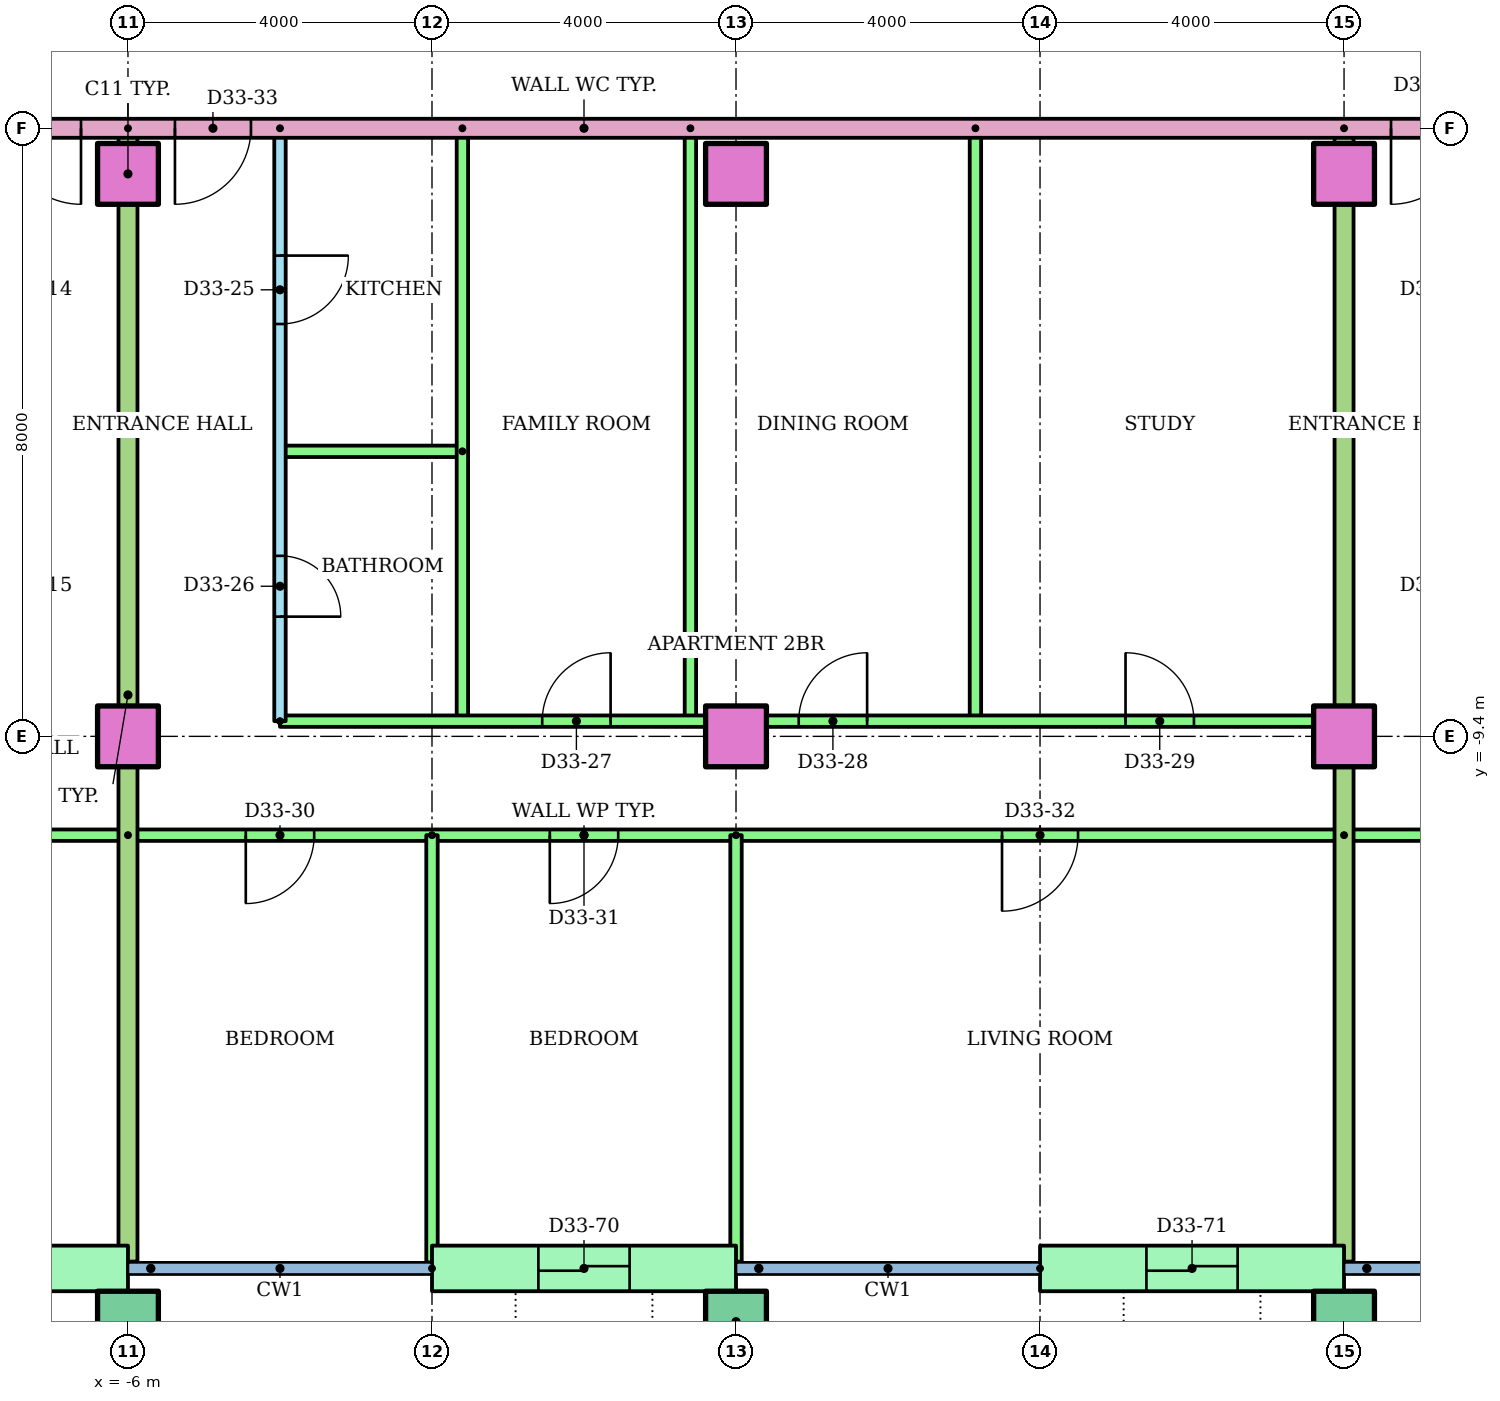
"""IFC4 building model, lengths in metres.
Left out: names, types, materials, properties, quantities, classifications, styles, units other than length and angle.
Written with IfcOpenShell. Run it as: python <this file> out.ifc"""

import sys

from ifc_helpers import new_model, si_unit, direction, frame, frame_2d, origin, origin_2d, place, context, subcontext, project, spatial, rectangle, hollow_rectangle, extrude, element, fill, save


model = new_model("IFC4")
c1 = context("Model", 3, precision=1e-05, world=origin(), true_north=direction((0.0, 1.0)))
c2 = subcontext(c1, "Body", "Model", "MODEL_VIEW")
j1 = project(units=[si_unit("LENGTHUNIT", "METRE"), si_unit("PLANEANGLEUNIT", "RADIAN")], contexts=[c1])
p1 = place(None, origin())
s1 = spatial("IfcSite", under=j1, at=p1, CompositionType="ELEMENT")
p2 = place(p1, origin())
s2 = spatial("IfcBuilding", under=s1, at=p2, CompositionType="ELEMENT")
p3 = place(p2, frame((0.0, 0.0, 129.4)))
s3 = spatial("IfcBuildingStorey", under=s2, at=p3, CompositionType="ELEMENT", Elevation=129.4)
for number, where in (
    (1, (-6.0, -17.1, 0.0)),
    (2, (2.0, -17.1, 0.0)),
    (3, (10.0, -17.1, 0.0)),
):
    element("IfcColumn", number, at=place(p3, frame(where)), inside=s3, PredefinedType="COLUMN", context=c2, shape_type="SweptSolid", body=[
        extrude(hollow_rectangle(XDim=0.8, YDim=0.8, WallThickness=0.04, at=origin_2d()), origin(), (0.0, 0.0, 1.0), 3.2),
    ])
for number, where in (
    (4, (-6.0, -9.4, 0.0)),
    (5, (2.0, -9.4, 0.0)),
    (6, (10.0, -9.4, 0.0)),
    (7, (-6.0, -2.0, 0.0)),
    (8, (2.0, -2.0, 0.0)),
    (9, (10.0, -2.0, 0.0)),
):
    element("IfcColumn", number, at=place(p3, frame(where)), inside=s3, PredefinedType="COLUMN", context=c2, shape_type="SweptSolid", body=[
        extrude(rectangle(XDim=0.8, YDim=0.8, at=origin_2d()), origin(), (0.0, 0.0, 1.0), 3.2),
    ])
p4 = place(p3, frame((-10.0, -16.4, 0.0)))
e10 = element("IfcWall", 10, at=p4, inside=s3, PredefinedType="STANDARD", context=c2, shape_type="SweptSolid", body=[
    extrude(rectangle(XDim=4.0, YDim=0.6, at=frame_2d((2.0, 0.0))), origin(), (0.0, 0.0, 1.0), 2.92),
])
p5 = place(p4, frame((1.4, 0.0, 0.0)))
e11 = element("IfcOpeningElement", 11, at=p5, cuts=e10, PredefinedType="OPENING", context=c2, shape_type="SweptSolid", body=[
    extrude(rectangle(XDim=1.2, YDim=2.1, at=frame_2d((0.6, 1.05))), frame((0.0, 0.31, 0.0), z_axis=(0.0, -1.0, 0.0), x_axis=(1.0, 0.0, 0.0)), (0.0, 0.0, 1.0), 0.62),
])
p6 = place(p3, frame((-2.0, -16.4, 0.0)))
e12 = element("IfcWall", 12, at=p6, inside=s3, PredefinedType="STANDARD", context=c2, shape_type="SweptSolid", body=[
    extrude(rectangle(XDim=4.0, YDim=0.6, at=frame_2d((2.0, 0.0))), origin(), (0.0, 0.0, 1.0), 2.92),
])
p7 = place(p6, frame((1.4, 0.0, 0.0)))
e13 = element("IfcOpeningElement", 13, at=p7, cuts=e12, PredefinedType="OPENING", context=c2, shape_type="SweptSolid", body=[
    extrude(rectangle(XDim=1.2, YDim=2.1, at=frame_2d((0.6, 1.05))), frame((0.0, 0.31, 0.0), z_axis=(0.0, -1.0, 0.0), x_axis=(1.0, 0.0, 0.0)), (0.0, 0.0, 1.0), 0.62),
])
p8 = place(p3, frame((6.0, -16.4, 0.0)))
e14 = element("IfcWall", 14, at=p8, inside=s3, PredefinedType="STANDARD", context=c2, shape_type="SweptSolid", body=[
    extrude(rectangle(XDim=4.0, YDim=0.6, at=frame_2d((2.0, 0.0))), origin(), (0.0, 0.0, 1.0), 2.92),
])
p9 = place(p8, frame((1.4, 0.0, 0.0)))
e15 = element("IfcOpeningElement", 15, at=p9, cuts=e14, PredefinedType="OPENING", context=c2, shape_type="SweptSolid", body=[
    extrude(rectangle(XDim=1.2, YDim=2.1, at=frame_2d((0.6, 1.05))), frame((0.0, 0.31, 0.0), z_axis=(0.0, -1.0, 0.0), x_axis=(1.0, 0.0, 0.0)), (0.0, 0.0, 1.0), 0.62),
])
p10 = place(p3, frame((-6.0, -10.7, 0.0), z_axis=(0.0, 0.0, 1.0), x_axis=(-1.0, 0.0, 0.0)))
e16 = element("IfcWall", 16, at=p10, inside=s3, PredefinedType="PARTITIONING", context=c2, shape_type="SweptSolid", body=[
    extrude(rectangle(XDim=26.72, YDim=0.15, at=frame_2d((13.36, 0.0))), origin(), (0.0, 0.0, 1.0), 2.4),
])
p11 = place(p10, frame((20.75, 0.0, 0.0)))
e17 = element("IfcOpeningElement", 17, at=p11, cuts=e16, PredefinedType="OPENING", context=c2, shape_type="SweptSolid", body=[
    extrude(rectangle(XDim=1.0, YDim=2.1, at=frame_2d((0.5, 1.05))), frame((0.0, 0.085, 0.0), z_axis=(0.0, -1.0, 0.0), x_axis=(1.0, 0.0, 0.0)), (0.0, 0.0, 1.0), 0.17),
])
p12 = place(p10, frame((13.55, 0.0, 0.0)))
e18 = element("IfcOpeningElement", 18, at=p12, cuts=e16, PredefinedType="OPENING", context=c2, shape_type="SweptSolid", body=[
    extrude(rectangle(XDim=0.9, YDim=2.1, at=frame_2d((0.45, 1.05))), frame((0.0, 0.085, 0.0), z_axis=(0.0, -1.0, 0.0), x_axis=(1.0, 0.0, 0.0)), (0.0, 0.0, 1.0), 0.17),
])
p13 = place(p10, frame((9.55, 0.0, 0.0)))
e19 = element("IfcOpeningElement", 19, at=p13, cuts=e16, PredefinedType="OPENING", context=c2, shape_type="SweptSolid", body=[
    extrude(rectangle(XDim=0.9, YDim=2.1, at=frame_2d((0.45, 1.05))), frame((0.0, 0.085, 0.0), z_axis=(0.0, -1.0, 0.0), x_axis=(1.0, 0.0, 0.0)), (0.0, 0.0, 1.0), 0.17),
])
p14 = place(p10, frame((5.55, 0.0, 0.0)))
e20 = element("IfcOpeningElement", 20, at=p14, cuts=e16, PredefinedType="OPENING", context=c2, shape_type="SweptSolid", body=[
    extrude(rectangle(XDim=0.9, YDim=2.1, at=frame_2d((0.45, 1.05))), frame((0.0, 0.085, 0.0), z_axis=(0.0, -1.0, 0.0), x_axis=(1.0, 0.0, 0.0)), (0.0, 0.0, 1.0), 0.17),
])
p15 = place(p10, frame((1.55, 0.0, 0.0)))
e21 = element("IfcOpeningElement", 21, at=p15, cuts=e16, PredefinedType="OPENING", context=c2, shape_type="SweptSolid", body=[
    extrude(rectangle(XDim=0.9, YDim=2.1, at=frame_2d((0.45, 1.05))), frame((0.0, 0.085, 0.0), z_axis=(0.0, -1.0, 0.0), x_axis=(1.0, 0.0, 0.0)), (0.0, 0.0, 1.0), 0.17),
])
p16 = place(p3, frame((-4.0, -1.4, 0.0), z_axis=(0.0, 0.0, 1.0), x_axis=(0.0, -1.0, 0.0)))
e22 = element("IfcWall", 22, at=p16, inside=s3, PredefinedType="PARTITIONING", context=c2, shape_type="SweptSolid", body=[
    extrude(rectangle(XDim=7.8, YDim=0.15, at=frame_2d((3.9, 0.0))), origin(), (0.0, 0.0, 1.0), 2.4),
])
p17 = place(p16, frame((1.675, 0.0, 0.0)))
e23 = element("IfcOpeningElement", 23, at=p17, cuts=e22, PredefinedType="OPENING", context=c2, shape_type="SweptSolid", body=[
    extrude(rectangle(XDim=0.9, YDim=2.1, at=frame_2d((0.45, 1.05))), frame((0.0, 0.085, 0.0), z_axis=(0.0, -1.0, 0.0), x_axis=(1.0, 0.0, 0.0)), (0.0, 0.0, 1.0), 0.17),
])
p18 = place(p16, frame((5.625, 0.0, 0.0)))
e24 = element("IfcOpeningElement", 24, at=p18, cuts=e22, PredefinedType="OPENING", context=c2, shape_type="SweptSolid", body=[
    extrude(rectangle(XDim=0.8, YDim=2.1, at=frame_2d((0.4, 1.05))), frame((0.0, 0.085, 0.0), z_axis=(0.0, -1.0, 0.0), x_axis=(1.0, 0.0, 0.0)), (0.0, 0.0, 1.0), 0.17),
])
p19 = place(p3, frame((-1.6, -5.65, 0.0), z_axis=(0.0, 0.0, 1.0), x_axis=(-1.0, 0.0, 0.0)))
e25 = element("IfcWall", 25, at=p19, inside=s3, PredefinedType="PARTITIONING", context=c2, shape_type="SweptSolid", body=[
    extrude(rectangle(XDim=2.4, YDim=0.15, at=frame_2d((1.2, 0.0))), origin(), (0.0, 0.0, 1.0), 2.4),
])
for number, where, z_axis, x_axis in (
    (26, (-1.6, -1.4, 0.0), (0.0, 0.0, 1.0), (0.0, -1.0, 0.0)),
    (27, (1.4, -1.4, 0.0), (0.0, 0.0, 1.0), (0.0, -1.0, 0.0)),
    (28, (5.15, -1.4, 0.0), (0.0, 0.0, 1.0), (0.0, -1.0, 0.0)),
):
    element("IfcWall", number, at=place(p3, frame(where, z_axis=z_axis, x_axis=x_axis)), inside=s3, PredefinedType="PARTITIONING", context=c2, shape_type="SweptSolid", body=[
        extrude(rectangle(XDim=7.8, YDim=0.15, at=frame_2d((3.9, 0.0))), origin(), (0.0, 0.0, 1.0), 2.4),
    ])
p20 = place(p3, frame((-4.0, -9.2, 0.0)))
e29 = element("IfcWall", 29, at=p20, inside=s3, PredefinedType="PARTITIONING", context=c2, shape_type="SweptSolid", body=[
    extrude(rectangle(XDim=14.0, YDim=0.15, at=frame_2d((7.0, 0.0))), origin(), (0.0, 0.0, 1.0), 2.4),
])
p21 = place(p20, frame((3.45, 0.0, 0.0)))
e30 = element("IfcOpeningElement", 30, at=p21, cuts=e29, PredefinedType="OPENING", context=c2, shape_type="SweptSolid", body=[
    extrude(rectangle(XDim=0.9, YDim=2.1, at=frame_2d((0.45, 1.05))), frame((0.0, 0.085, 0.0), z_axis=(0.0, -1.0, 0.0), x_axis=(1.0, 0.0, 0.0)), (0.0, 0.0, 1.0), 0.17),
])
p22 = place(p20, frame((6.825, 0.0, 0.0)))
e31 = element("IfcOpeningElement", 31, at=p22, cuts=e29, PredefinedType="OPENING", context=c2, shape_type="SweptSolid", body=[
    extrude(rectangle(XDim=0.9, YDim=2.1, at=frame_2d((0.45, 1.05))), frame((0.0, 0.085, 0.0), z_axis=(0.0, -1.0, 0.0), x_axis=(1.0, 0.0, 0.0)), (0.0, 0.0, 1.0), 0.17),
])
p23 = place(p20, frame((11.125, 0.0, 0.0)))
e32 = element("IfcOpeningElement", 32, at=p23, cuts=e29, PredefinedType="OPENING", context=c2, shape_type="SweptSolid", body=[
    extrude(rectangle(XDim=0.9, YDim=2.1, at=frame_2d((0.45, 1.05))), frame((0.0, 0.085, 0.0), z_axis=(0.0, -1.0, 0.0), x_axis=(1.0, 0.0, 0.0)), (0.0, 0.0, 1.0), 0.17),
])
p24 = place(p3, frame((10.0, -10.7, 0.0), z_axis=(0.0, 0.0, 1.0), x_axis=(-1.0, 0.0, 0.0)))
e33 = element("IfcWall", 33, at=p24, inside=s3, PredefinedType="PARTITIONING", context=c2, shape_type="SweptSolid", body=[
    extrude(rectangle(XDim=16.0, YDim=0.15, at=frame_2d((8.0, 0.0))), origin(), (0.0, 0.0, 1.0), 2.4),
])
p25 = place(p24, frame((13.55, 0.0, 0.0)))
e34 = element("IfcOpeningElement", 34, at=p25, cuts=e33, PredefinedType="OPENING", context=c2, shape_type="SweptSolid", body=[
    extrude(rectangle(XDim=0.9, YDim=2.1, at=frame_2d((0.45, 1.05))), frame((0.0, 0.085, 0.0), z_axis=(0.0, -1.0, 0.0), x_axis=(1.0, 0.0, 0.0)), (0.0, 0.0, 1.0), 0.17),
])
p26 = place(p24, frame((9.55, 0.0, 0.0)))
e35 = element("IfcOpeningElement", 35, at=p26, cuts=e33, PredefinedType="OPENING", context=c2, shape_type="SweptSolid", body=[
    extrude(rectangle(XDim=0.9, YDim=2.1, at=frame_2d((0.45, 1.05))), frame((0.0, 0.085, 0.0), z_axis=(0.0, -1.0, 0.0), x_axis=(1.0, 0.0, 0.0)), (0.0, 0.0, 1.0), 0.17),
])
p27 = place(p24, frame((3.5, 0.0, 0.0)))
e36 = element("IfcOpeningElement", 36, at=p27, cuts=e33, PredefinedType="OPENING", context=c2, shape_type="SweptSolid", body=[
    extrude(rectangle(XDim=1.0, YDim=2.1, at=frame_2d((0.5, 1.05))), frame((0.0, 0.085, 0.0), z_axis=(0.0, -1.0, 0.0), x_axis=(1.0, 0.0, 0.0)), (0.0, 0.0, 1.0), 0.17),
])
p28 = place(p3, frame((-2.0, -10.7, 0.0), z_axis=(0.0, 0.0, 1.0), x_axis=(0.0, -1.0, 0.0)))
e37 = element("IfcWall", 37, at=p28, inside=s3, PredefinedType="PARTITIONING", context=c2, shape_type="SweptSolid", body=[
    extrude(rectangle(XDim=5.621, YDim=0.15, at=frame_2d((2.811, 0.0))), origin(), (0.0, 0.0, 1.0), 2.4),
])
p29 = place(p3, frame((2.0, -10.7, 0.0), z_axis=(0.0, 0.0, 1.0), x_axis=(0.0, -1.0, 0.0)))
e38 = element("IfcWall", 38, at=p29, inside=s3, PredefinedType="PARTITIONING", context=c2, shape_type="SweptSolid", body=[
    extrude(rectangle(XDim=5.61, YDim=0.15, at=frame_2d((2.805, 0.0))), origin(), (0.0, 0.0, 1.0), 2.4),
])
p30 = place(p3, frame((-6.0, -1.4, 0.0), z_axis=(0.0, 0.0, 1.0), x_axis=(0.0, -1.0, 0.0)))
e39 = element("IfcWall", 39, at=p30, inside=s3, PredefinedType="PARTITIONING", context=c2, shape_type="SweptSolid", body=[
    extrude(rectangle(XDim=14.91, YDim=0.25, at=frame_2d((7.455, 0.0))), origin(), (0.0, 0.0, 1.0), 2.4),
])
p31 = place(p3, frame((32.72, -10.7, 0.0), z_axis=(0.0, 0.0, 1.0), x_axis=(-1.0, 0.0, 0.0)))
e40 = element("IfcWall", 40, at=p31, inside=s3, PredefinedType="PARTITIONING", context=c2, shape_type="SweptSolid", body=[
    extrude(rectangle(XDim=22.72, YDim=0.15, at=frame_2d((11.36, 0.0))), origin(), (0.0, 0.0, 1.0), 2.4),
])
p32 = place(p31, frame((20.27, 0.0, 0.0)))
e41 = element("IfcOpeningElement", 41, at=p32, cuts=e40, PredefinedType="OPENING", context=c2, shape_type="SweptSolid", body=[
    extrude(rectangle(XDim=0.9, YDim=2.1, at=frame_2d((0.45, 1.05))), frame((0.0, 0.085, 0.0), z_axis=(0.0, -1.0, 0.0), x_axis=(1.0, 0.0, 0.0)), (0.0, 0.0, 1.0), 0.17),
])
p33 = place(p31, frame((16.27, 0.0, 0.0)))
e42 = element("IfcOpeningElement", 42, at=p33, cuts=e40, PredefinedType="OPENING", context=c2, shape_type="SweptSolid", body=[
    extrude(rectangle(XDim=0.9, YDim=2.1, at=frame_2d((0.45, 1.05))), frame((0.0, 0.085, 0.0), z_axis=(0.0, -1.0, 0.0), x_axis=(1.0, 0.0, 0.0)), (0.0, 0.0, 1.0), 0.17),
])
p34 = place(p31, frame((10.22, 0.0, 0.0)))
e43 = element("IfcOpeningElement", 43, at=p34, cuts=e40, PredefinedType="OPENING", context=c2, shape_type="SweptSolid", body=[
    extrude(rectangle(XDim=1.0, YDim=2.1, at=frame_2d((0.5, 1.05))), frame((0.0, 0.085, 0.0), z_axis=(0.0, -1.0, 0.0), x_axis=(1.0, 0.0, 0.0)), (0.0, 0.0, 1.0), 0.17),
])
p35 = place(p31, frame((3.02, 0.0, 0.0)))
e44 = element("IfcOpeningElement", 44, at=p35, cuts=e40, PredefinedType="OPENING", context=c2, shape_type="SweptSolid", body=[
    extrude(rectangle(XDim=0.9, YDim=2.1, at=frame_2d((0.45, 1.05))), frame((0.0, 0.085, 0.0), z_axis=(0.0, -1.0, 0.0), x_axis=(1.0, 0.0, 0.0)), (0.0, 0.0, 1.0), 0.17),
])
p36 = place(p3, frame((10.0, -1.4, 0.0), z_axis=(0.0, 0.0, 1.0), x_axis=(0.0, -1.0, 0.0)))
e45 = element("IfcWall", 45, at=p36, inside=s3, PredefinedType="PARTITIONING", context=c2, shape_type="SweptSolid", body=[
    extrude(rectangle(XDim=14.91, YDim=0.25, at=frame_2d((7.455, 0.0))), origin(), (0.0, 0.0, 1.0), 2.4),
])
p37 = place(p3, frame((14.0, -1.4, 0.0), z_axis=(0.0, 0.0, 1.0), x_axis=(-1.0, 0.0, 0.0)))
e46 = element("IfcWall", 46, at=p37, inside=s3, PredefinedType="PARTITIONING", context=c2, shape_type="SweptSolid", body=[
    extrude(rectangle(XDim=28.0, YDim=0.25, at=frame_2d((14.0, 0.0))), origin(), (0.0, 0.0, 1.0), 2.4),
])
p38 = place(p37, frame((20.618, 0.0, 0.0)))
e47 = element("IfcOpeningElement", 47, at=p38, cuts=e46, PredefinedType="OPENING", context=c2, shape_type="SweptSolid", body=[
    extrude(rectangle(XDim=1.0, YDim=2.1, at=frame_2d((0.5, 1.05))), frame((0.0, 0.135, 0.0), z_axis=(0.0, -1.0, 0.0), x_axis=(1.0, 0.0, 0.0)), (0.0, 0.0, 1.0), 0.27),
])
p39 = place(p37, frame((18.382, 0.0, 0.0)))
e48 = element("IfcOpeningElement", 48, at=p39, cuts=e46, PredefinedType="OPENING", context=c2, shape_type="SweptSolid", body=[
    extrude(rectangle(XDim=1.0, YDim=2.1, at=frame_2d((0.5, 1.05))), frame((0.0, 0.135, 0.0), z_axis=(0.0, -1.0, 0.0), x_axis=(1.0, 0.0, 0.0)), (0.0, 0.0, 1.0), 0.27),
])
p40 = place(p37, frame((2.382, 0.0, 0.0)))
e49 = element("IfcOpeningElement", 49, at=p40, cuts=e46, PredefinedType="OPENING", context=c2, shape_type="SweptSolid", body=[
    extrude(rectangle(XDim=1.0, YDim=2.1, at=frame_2d((0.5, 1.05))), frame((0.0, 0.135, 0.0), z_axis=(0.0, -1.0, 0.0), x_axis=(1.0, 0.0, 0.0)), (0.0, 0.0, 1.0), 0.27),
])
p41 = place(p38, origin())
e50 = element("IfcDoor", 50, at=p41, inside=s3, OperationType="SINGLE_SWING_LEFT", PredefinedType="DOOR", context=c2, shape_type="SweptSolid", body=[
    extrude(rectangle(XDim=1.0, YDim=2.1, at=frame_2d((0.5, 1.05))), frame((0.0, 0.025, 0.0), z_axis=(0.0, -1.0, 0.0), x_axis=(1.0, 0.0, 0.0)), (0.0, 0.0, 1.0), 0.05),
])
fill(e47, e50)
p42 = place(p17, origin())
e51 = element("IfcDoor", 51, at=p42, inside=s3, OperationType="SINGLE_SWING_LEFT", PredefinedType="DOOR", context=c2, shape_type="SweptSolid", body=[
    extrude(rectangle(XDim=0.9, YDim=2.1, at=frame_2d((0.45, 1.05))), frame((0.0, 0.025, 0.0), z_axis=(0.0, -1.0, 0.0), x_axis=(1.0, 0.0, 0.0)), (0.0, 0.0, 1.0), 0.05),
])
fill(e23, e51)
p43 = place(p18, origin())
e52 = element("IfcDoor", 52, at=p43, inside=s3, OperationType="SINGLE_SWING_RIGHT", PredefinedType="DOOR", context=c2, shape_type="SweptSolid", body=[
    extrude(rectangle(XDim=0.8, YDim=2.1, at=frame_2d((0.4, 1.05))), frame((0.0, 0.025, 0.0), z_axis=(0.0, -1.0, 0.0), x_axis=(1.0, 0.0, 0.0)), (0.0, 0.0, 1.0), 0.05),
])
fill(e24, e52)
p44 = place(p21, origin())
e53 = element("IfcDoor", 53, at=p44, inside=s3, OperationType="SINGLE_SWING_RIGHT", PredefinedType="DOOR", context=c2, shape_type="SweptSolid", body=[
    extrude(rectangle(XDim=0.9, YDim=2.1, at=frame_2d((0.45, 1.05))), frame((0.0, 0.025, 0.0), z_axis=(0.0, -1.0, 0.0), x_axis=(1.0, 0.0, 0.0)), (0.0, 0.0, 1.0), 0.05),
])
fill(e30, e53)
p45 = place(p22, origin())
e54 = element("IfcDoor", 54, at=p45, inside=s3, OperationType="SINGLE_SWING_RIGHT", PredefinedType="DOOR", context=c2, shape_type="SweptSolid", body=[
    extrude(rectangle(XDim=0.9, YDim=2.1, at=frame_2d((0.45, 1.05))), frame((0.0, 0.025, 0.0), z_axis=(0.0, -1.0, 0.0), x_axis=(1.0, 0.0, 0.0)), (0.0, 0.0, 1.0), 0.05),
])
fill(e31, e54)
p46 = place(p23, origin())
e55 = element("IfcDoor", 55, at=p46, inside=s3, OperationType="SINGLE_SWING_LEFT", PredefinedType="DOOR", context=c2, shape_type="SweptSolid", body=[
    extrude(rectangle(XDim=0.9, YDim=2.1, at=frame_2d((0.45, 1.05))), frame((0.0, 0.025, 0.0), z_axis=(0.0, -1.0, 0.0), x_axis=(1.0, 0.0, 0.0)), (0.0, 0.0, 1.0), 0.05),
])
fill(e32, e55)
p47 = place(p25, origin())
e56 = element("IfcDoor", 56, at=p47, inside=s3, OperationType="SINGLE_SWING_RIGHT", PredefinedType="DOOR", context=c2, shape_type="SweptSolid", body=[
    extrude(rectangle(XDim=0.9, YDim=2.1, at=frame_2d((0.45, 1.05))), frame((0.0, 0.025, 0.0), z_axis=(0.0, -1.0, 0.0), x_axis=(1.0, 0.0, 0.0)), (0.0, 0.0, 1.0), 0.05),
])
fill(e34, e56)
p48 = place(p26, origin())
e57 = element("IfcDoor", 57, at=p48, inside=s3, OperationType="SINGLE_SWING_RIGHT", PredefinedType="DOOR", context=c2, shape_type="SweptSolid", body=[
    extrude(rectangle(XDim=0.9, YDim=2.1, at=frame_2d((0.45, 1.05))), frame((0.0, 0.025, 0.0), z_axis=(0.0, -1.0, 0.0), x_axis=(1.0, 0.0, 0.0)), (0.0, 0.0, 1.0), 0.05),
])
fill(e35, e57)
p49 = place(p27, origin())
e58 = element("IfcDoor", 58, at=p49, inside=s3, OperationType="SINGLE_SWING_RIGHT", PredefinedType="DOOR", context=c2, shape_type="SweptSolid", body=[
    extrude(rectangle(XDim=1.0, YDim=2.1, at=frame_2d((0.5, 1.05))), frame((0.0, 0.025, 0.0), z_axis=(0.0, -1.0, 0.0), x_axis=(1.0, 0.0, 0.0)), (0.0, 0.0, 1.0), 0.05),
])
fill(e36, e58)
p50 = place(p39, origin())
e59 = element("IfcDoor", 59, at=p50, inside=s3, OperationType="SINGLE_SWING_RIGHT", PredefinedType="DOOR", context=c2, shape_type="SweptSolid", body=[
    extrude(rectangle(XDim=1.0, YDim=2.1, at=frame_2d((0.5, 1.05))), frame((0.0, 0.025, 0.0), z_axis=(0.0, -1.0, 0.0), x_axis=(1.0, 0.0, 0.0)), (0.0, 0.0, 1.0), 0.05),
])
fill(e48, e59)
p51 = place(p40, origin())
e60 = element("IfcDoor", 60, at=p51, inside=s3, OperationType="SINGLE_SWING_RIGHT", PredefinedType="DOOR", context=c2, shape_type="SweptSolid", body=[
    extrude(rectangle(XDim=1.0, YDim=2.1, at=frame_2d((0.5, 1.05))), frame((0.0, 0.025, 0.0), z_axis=(0.0, -1.0, 0.0), x_axis=(1.0, 0.0, 0.0)), (0.0, 0.0, 1.0), 0.05),
])
fill(e49, e60)
p52 = place(p7, origin())
e61 = element("IfcDoor", 61, at=p52, inside=s3, OperationType="SLIDING_TO_LEFT", PredefinedType="DOOR", context=c2, shape_type="SweptSolid", body=[
    extrude(rectangle(XDim=1.2, YDim=2.1, at=frame_2d((0.6, 1.05))), frame((0.0, 0.025, 0.0), z_axis=(0.0, -1.0, 0.0), x_axis=(1.0, 0.0, 0.0)), (0.0, 0.0, 1.0), 0.05),
])
fill(e13, e61)
p53 = place(p9, origin())
e62 = element("IfcDoor", 62, at=p53, inside=s3, OperationType="SLIDING_TO_LEFT", PredefinedType="DOOR", context=c2, shape_type="SweptSolid", body=[
    extrude(rectangle(XDim=1.2, YDim=2.1, at=frame_2d((0.6, 1.05))), frame((0.0, 0.025, 0.0), z_axis=(0.0, -1.0, 0.0), x_axis=(1.0, 0.0, 0.0)), (0.0, 0.0, 1.0), 0.05),
])
fill(e15, e62)
save(model, sys.argv[1])
